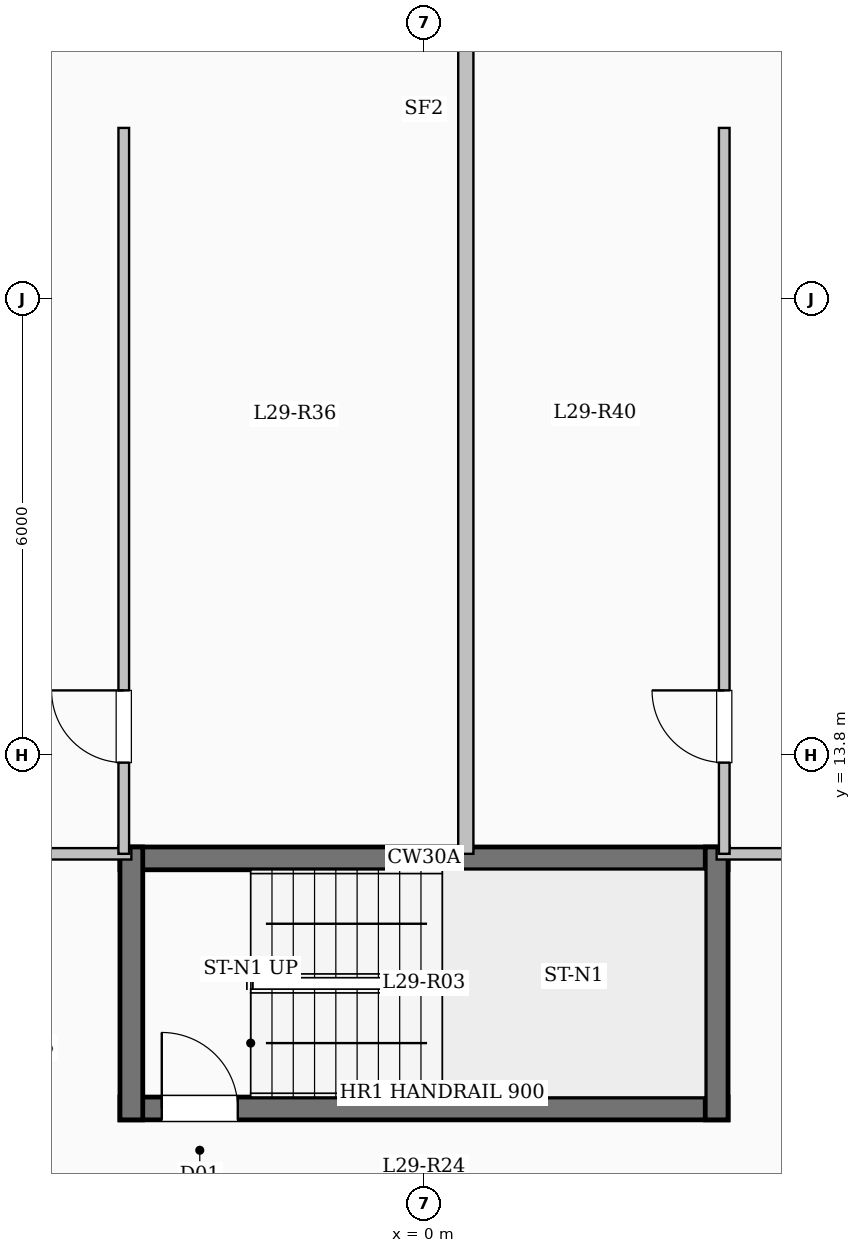
"""IFC4 building model, lengths in metres.
Left out: names, types, materials, properties, quantities, classifications, styles, units other than length and angle.
Written with IfcOpenShell. Run it as: python <this file> out.ifc"""

import sys

from ifc_helpers import new_model, si_unit, direction, frame, frame_2d, origin, place, context, subcontext, project, spatial, rectangle, extrude, element, fill, save


model = new_model("IFC4")
c1 = context("Model", 3, precision=1e-05, world=origin(), true_north=direction((0.0, 1.0)))
c2 = subcontext(c1, "Body", "Model", "MODEL_VIEW")
j1 = project(units=[si_unit("LENGTHUNIT", "METRE"), si_unit("PLANEANGLEUNIT", "RADIAN")], contexts=[c1])
p1 = place(None, origin())
s1 = spatial("IfcSite", under=j1, at=p1, CompositionType="ELEMENT")
p2 = place(p1, origin())
s2 = spatial("IfcBuilding", under=s1, at=p2, CompositionType="ELEMENT")
p3 = place(p2, frame((0.0, 0.0, 108.45)))
s3 = spatial("IfcBuildingStorey", under=s2, at=p3, CompositionType="ELEMENT", Elevation=108.45)
p4 = place(p3, frame((-7.35, 22.05, 0.0), z_axis=(0.0, 0.0, 1.0), x_axis=(0.894427191, 0.4472135955, 0.0)))
e1 = element("IfcWall", 1, at=p4, inside=s3, PredefinedType="SOLIDWALL", context=c2, shape_type="SweptSolid", body=[
    extrude(rectangle(XDim=3.354, YDim=0.28, at=frame_2d((1.677, 0.0))), origin(), (0.0, 0.0, 1.0), 3.1),
])
p5 = place(p4, frame((0.501, 0.0, 0.95)))
e2 = element("IfcOpeningElement", 2, at=p5, cuts=e1, PredefinedType="OPENING", context=c2, shape_type="SweptSolid", body=[
    extrude(rectangle(XDim=1.2, YDim=1.5, at=frame_2d((0.6, 0.75))), frame((0.0, 0.15, 0.0), z_axis=(0.0, -1.0, 0.0), x_axis=(1.0, 0.0, 0.0)), (0.0, 0.0, 1.0), 0.3),
])
p6 = place(p3, frame((4.35, 23.55, 0.0), z_axis=(0.0, 0.0, 1.0), x_axis=(0.894427191, -0.4472135955, 0.0)))
e3 = element("IfcWall", 3, at=p6, inside=s3, PredefinedType="SOLIDWALL", context=c2, shape_type="SweptSolid", body=[
    extrude(rectangle(XDim=3.354, YDim=0.28, at=frame_2d((1.677, 0.0))), origin(), (0.0, 0.0, 1.0), 3.1),
])
p7 = place(p6, frame((1.653, 0.0, 0.95)))
e4 = element("IfcOpeningElement", 4, at=p7, cuts=e3, PredefinedType="OPENING", context=c2, shape_type="SweptSolid", body=[
    extrude(rectangle(XDim=1.2, YDim=1.5, at=frame_2d((0.6, 0.75))), frame((0.0, 0.15, 0.0), z_axis=(0.0, -1.0, 0.0), x_axis=(1.0, 0.0, 0.0)), (0.0, 0.0, 1.0), 0.3),
])
p8 = place(p3, frame((-4.0, 12.44, 0.0), z_axis=(0.0, 0.0, 1.0), x_axis=(1.0, 0.0, 0.0)))
e5 = element("IfcWall", 5, at=p8, inside=s3, PredefinedType="SHEAR", context=c2, shape_type="SweptSolid", body=[
    extrude(rectangle(XDim=8.0, YDim=0.3, at=frame_2d((4.0, 0.0))), origin(), (0.0, 0.0, 1.0), 3.35),
])
p9 = place(p3, frame((-4.0, 9.15, 0.0), z_axis=(0.0, 0.0, 1.0), x_axis=(1.0, 0.0, 0.0)))
e6 = element("IfcWall", 6, at=p9, inside=s3, PredefinedType="SHEAR", context=c2, shape_type="SweptSolid", body=[
    extrude(rectangle(XDim=8.0, YDim=0.3, at=frame_2d((4.0, 0.0))), origin(), (0.0, 0.0, 1.0), 3.35),
])
p10 = place(p9, frame((0.55, 0.0, 0.0)))
e7 = element("IfcOpeningElement", 7, at=p10, cuts=e6, PredefinedType="OPENING", context=c2, shape_type="SweptSolid", body=[
    extrude(rectangle(XDim=1.0, YDim=2.15, at=frame_2d((0.5, 1.075))), frame((0.0, 0.16, 0.0), z_axis=(0.0, -1.0, 0.0), x_axis=(1.0, 0.0, 0.0)), (0.0, 0.0, 1.0), 0.32),
])
for number, where, z_axis, x_axis in (
    (8, (-3.85, 9.0, 0.0), (0.0, 0.0, 1.0), (0.0, 1.0, 0.0)),
    (9, (3.85, 9.0, 0.0), (0.0, 0.0, 1.0), (0.0, 1.0, 0.0)),
):
    element("IfcWall", number, at=place(p3, frame(where, z_axis=z_axis, x_axis=x_axis)), inside=s3, PredefinedType="SHEAR", context=c2, shape_type="SweptSolid", body=[
        extrude(rectangle(XDim=3.59, YDim=0.3, at=frame_2d((1.795, 0.0))), origin(), (0.0, 0.0, 1.0), 3.35),
    ])
p11 = place(p3, frame((-21.05, 12.5, 0.0), z_axis=(0.0, 0.0, 1.0), x_axis=(1.0, 0.0, 0.0)))
e10 = element("IfcWall", 10, at=p11, inside=s3, PredefinedType="PARTITIONING", context=c2, shape_type="SweptSolid", body=[
    extrude(rectangle(XDim=17.2, YDim=0.15, at=frame_2d((8.6, 0.0))), origin(), (0.0, 0.0, 1.0), 3.1),
])
p12 = place(p11, frame((2.562, 0.0, 0.0)))
e11 = element("IfcOpeningElement", 11, at=p12, cuts=e10, PredefinedType="OPENING", context=c2, shape_type="SweptSolid", body=[
    extrude(rectangle(XDim=0.95, YDim=2.15, at=frame_2d((0.475, 1.075))), frame((0.0, 0.085, 0.0), z_axis=(0.0, -1.0, 0.0), x_axis=(1.0, 0.0, 0.0)), (0.0, 0.0, 1.0), 0.17),
])
p13 = place(p11, frame((8.726, 0.0, 0.0)))
e12 = element("IfcOpeningElement", 12, at=p13, cuts=e10, PredefinedType="OPENING", context=c2, shape_type="SweptSolid", body=[
    extrude(rectangle(XDim=0.95, YDim=2.15, at=frame_2d((0.475, 1.075))), frame((0.0, 0.085, 0.0), z_axis=(0.0, -1.0, 0.0), x_axis=(1.0, 0.0, 0.0)), (0.0, 0.0, 1.0), 0.17),
])
p14 = place(p11, frame((14.21, 0.0, 0.0)))
e13 = element("IfcOpeningElement", 13, at=p14, cuts=e10, PredefinedType="OPENING", context=c2, shape_type="SweptSolid", body=[
    extrude(rectangle(XDim=0.95, YDim=2.15, at=frame_2d((0.475, 1.075))), frame((0.0, 0.085, 0.0), z_axis=(0.0, -1.0, 0.0), x_axis=(1.0, 0.0, 0.0)), (0.0, 0.0, 1.0), 0.17),
])
p15 = place(p3, frame((3.85, 12.5, 0.0), z_axis=(0.0, 0.0, 1.0), x_axis=(1.0, 0.0, 0.0)))
e14 = element("IfcWall", 14, at=p15, inside=s3, PredefinedType="PARTITIONING", context=c2, shape_type="SweptSolid", body=[
    extrude(rectangle(XDim=17.2, YDim=0.15, at=frame_2d((8.6, 0.0))), origin(), (0.0, 0.0, 1.0), 3.1),
])
p16 = place(p15, frame((2.672, 0.0, 0.0)))
e15 = element("IfcOpeningElement", 15, at=p16, cuts=e14, PredefinedType="OPENING", context=c2, shape_type="SweptSolid", body=[
    extrude(rectangle(XDim=0.95, YDim=2.15, at=frame_2d((0.475, 1.075))), frame((0.0, 0.085, 0.0), z_axis=(0.0, -1.0, 0.0), x_axis=(1.0, 0.0, 0.0)), (0.0, 0.0, 1.0), 0.17),
])
p17 = place(p15, frame((8.837, 0.0, 0.0)))
e16 = element("IfcOpeningElement", 16, at=p17, cuts=e14, PredefinedType="OPENING", context=c2, shape_type="SweptSolid", body=[
    extrude(rectangle(XDim=0.95, YDim=2.15, at=frame_2d((0.475, 1.075))), frame((0.0, 0.085, 0.0), z_axis=(0.0, -1.0, 0.0), x_axis=(1.0, 0.0, 0.0)), (0.0, 0.0, 1.0), 0.17),
])
p18 = place(p15, frame((14.319, 0.0, 0.0)))
e17 = element("IfcOpeningElement", 17, at=p18, cuts=e14, PredefinedType="OPENING", context=c2, shape_type="SweptSolid", body=[
    extrude(rectangle(XDim=0.95, YDim=2.15, at=frame_2d((0.475, 1.075))), frame((0.0, 0.085, 0.0), z_axis=(0.0, -1.0, 0.0), x_axis=(1.0, 0.0, 0.0)), (0.0, 0.0, 1.0), 0.17),
])
p19 = place(p3, frame((0.55, 12.5, 0.0), z_axis=(0.0, 0.0, 1.0), x_axis=(0.0, 1.0, 0.0)))
e18 = element("IfcWall", 18, at=p19, inside=s3, PredefinedType="SOLIDWALL", context=c2, shape_type="SweptSolid", body=[
    extrude(rectangle(XDim=11.08, YDim=0.2, at=frame_2d((5.54, 0.0))), origin(), (0.0, 0.0, 1.0), 3.1),
])
p20 = place(p3, frame((-3.95, 12.5, 0.0), z_axis=(0.0, 0.0, 1.0), x_axis=(0.0, 1.0, 0.0)))
e19 = element("IfcWall", 19, at=p20, inside=s3, PredefinedType="PARTITIONING", context=c2, shape_type="SweptSolid", body=[
    extrude(rectangle(XDim=9.55, YDim=0.14, at=frame_2d((4.775, 0.0))), origin(), (0.0, 0.0, 1.0), 3.1),
])
p21 = place(p20, frame((1.2, 0.0, 0.0)))
e20 = element("IfcOpeningElement", 20, at=p21, cuts=e19, PredefinedType="OPENING", context=c2, shape_type="SweptSolid", body=[
    extrude(rectangle(XDim=0.95, YDim=2.15, at=frame_2d((0.475, 1.075))), frame((0.0, 0.08, 0.0), z_axis=(0.0, -1.0, 0.0), x_axis=(1.0, 0.0, 0.0)), (0.0, 0.0, 1.0), 0.16),
])
p22 = place(p3, frame((3.95, 12.5, 0.0), z_axis=(0.0, 0.0, 1.0), x_axis=(0.0, 1.0, 0.0)))
e21 = element("IfcWall", 21, at=p22, inside=s3, PredefinedType="PARTITIONING", context=c2, shape_type="SweptSolid", body=[
    extrude(rectangle(XDim=9.55, YDim=0.14, at=frame_2d((4.775, 0.0))), origin(), (0.0, 0.0, 1.0), 3.1),
])
p23 = place(p22, frame((1.2, 0.0, 0.0)))
e22 = element("IfcOpeningElement", 22, at=p23, cuts=e21, PredefinedType="OPENING", context=c2, shape_type="SweptSolid", body=[
    extrude(rectangle(XDim=0.95, YDim=2.15, at=frame_2d((0.475, 1.075))), frame((0.0, 0.08, 0.0), z_axis=(0.0, -1.0, 0.0), x_axis=(1.0, 0.0, 0.0)), (0.0, 0.0, 1.0), 0.16),
])
p24 = place(p10, origin())
e23 = element("IfcDoor", 23, at=p24, inside=s3, OperationType="SINGLE_SWING_LEFT", PredefinedType="DOOR", context=c2, shape_type="SweptSolid", body=[
    extrude(rectangle(XDim=1.0, YDim=2.15, at=frame_2d((0.5, 1.075))), frame((0.0, 0.025, 0.0), z_axis=(0.0, -1.0, 0.0), x_axis=(1.0, 0.0, 0.0)), (0.0, 0.0, 1.0), 0.05),
])
fill(e7, e23)
p25 = place(p21, origin())
e24 = element("IfcDoor", 24, at=p25, inside=s3, OperationType="SINGLE_SWING_RIGHT", PredefinedType="DOOR", context=c2, shape_type="SweptSolid", body=[
    extrude(rectangle(XDim=0.95, YDim=2.15, at=frame_2d((0.475, 1.075))), frame((0.0, 0.025, 0.0), z_axis=(0.0, -1.0, 0.0), x_axis=(1.0, 0.0, 0.0)), (0.0, 0.0, 1.0), 0.05),
])
fill(e20, e24)
p26 = place(p23, origin())
e25 = element("IfcDoor", 25, at=p26, inside=s3, OperationType="SINGLE_SWING_RIGHT", PredefinedType="DOOR", context=c2, shape_type="SweptSolid", body=[
    extrude(rectangle(XDim=0.95, YDim=2.15, at=frame_2d((0.475, 1.075))), frame((0.0, 0.025, 0.0), z_axis=(0.0, -1.0, 0.0), x_axis=(1.0, 0.0, 0.0)), (0.0, 0.0, 1.0), 0.05),
])
fill(e22, e25)
save(model, sys.argv[1])
